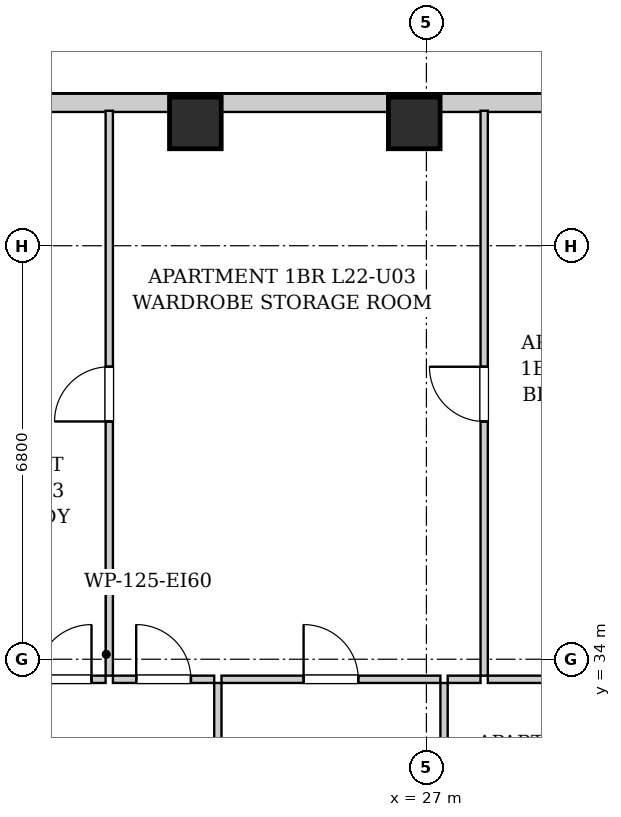
"""IFC4 building model, lengths in metres.
Left out: names, types, materials, properties, quantities, classifications, styles, units other than length and angle.
Written with IfcOpenShell. Run it as: python <this file> out.ifc"""

import sys

from ifc_helpers import new_model, si_unit, direction, frame, frame_2d, origin, origin_2d, place, context, subcontext, project, spatial, rectangle, extrude, element, fill, save


model = new_model("IFC4")
c1 = context("Model", 3, precision=1e-05, world=origin(), true_north=direction((0.0, 1.0)))
c2 = subcontext(c1, "Body", "Model", "MODEL_VIEW")
j1 = project(units=[si_unit("LENGTHUNIT", "METRE"), si_unit("PLANEANGLEUNIT", "RADIAN")], contexts=[c1])
p1 = place(None, origin())
s1 = spatial("IfcSite", under=j1, at=p1, CompositionType="ELEMENT")
p2 = place(p1, origin())
s2 = spatial("IfcBuilding", under=s1, at=p2, CompositionType="ELEMENT")
p3 = place(p2, frame((0.0, 0.0, 81.5)))
s3 = spatial("IfcBuildingStorey", under=s2, at=p3, CompositionType="ELEMENT", Elevation=81.5)
for number, where, z_axis, x_axis in (
    (1, (23.2, 42.82, 0.0), (0.0, 0.0, 1.0), (1.0, 0.0, 0.0)),
    (2, (26.8, 42.82, 0.0), (0.0, 0.0, 1.0), (1.0, 0.0, 0.0)),
):
    element("IfcColumn", number, at=place(p3, frame(where, z_axis=z_axis, x_axis=x_axis)), inside=s3, PredefinedType="COLUMN", context=c2, shape_type="SweptSolid", body=[
        extrude(rectangle(XDim=0.85, YDim=0.85, at=origin_2d()), origin(), (0.0, 0.0, 1.0), 3.2),
    ])
p4 = place(p3, frame((10.0, 43.15, 0.0), z_axis=(0.0, 0.0, 1.0), x_axis=(1.0, 0.0, 0.0)))
e3 = element("IfcWall", 3, at=p4, inside=s3, PredefinedType="SOLIDWALL", context=c2, shape_type="SweptSolid", body=[
    extrude(rectangle(XDim=22.5, YDim=0.3, at=frame_2d((11.25, 0.0))), origin(), (0.0, 0.0, 1.0), 2.94),
])
p5 = place(p4, frame((5.475, 0.0, 0.55)))
e4 = element("IfcOpeningElement", 4, at=p5, cuts=e3, PredefinedType="OPENING", context=c2, shape_type="SweptSolid", body=[
    extrude(rectangle(XDim=1.35, YDim=1.2, at=frame_2d((0.675, 0.6))), frame((0.0, 0.16, 0.0), z_axis=(0.0, -1.0, 0.0), x_axis=(1.0, 0.0, 0.0)), (0.0, 0.0, 1.0), 0.32),
])
p6 = place(p4, frame((9.3, 0.0, 0.55)))
e5 = element("IfcOpeningElement", 5, at=p6, cuts=e3, PredefinedType="OPENING", context=c2, shape_type="SweptSolid", body=[
    extrude(rectangle(XDim=1.35, YDim=1.2, at=frame_2d((0.675, 0.6))), frame((0.0, 0.16, 0.0), z_axis=(0.0, -1.0, 0.0), x_axis=(1.0, 0.0, 0.0)), (0.0, 0.0, 1.0), 0.32),
])
p7 = place(p4, frame((18.975, 0.0, 0.55)))
e6 = element("IfcOpeningElement", 6, at=p7, cuts=e3, PredefinedType="OPENING", context=c2, shape_type="SweptSolid", body=[
    extrude(rectangle(XDim=1.35, YDim=1.2, at=frame_2d((0.675, 0.6))), frame((0.0, 0.16, 0.0), z_axis=(0.0, -1.0, 0.0), x_axis=(1.0, 0.0, 0.0)), (0.0, 0.0, 1.0), 0.32),
])
p8 = place(p4, frame((21.59, 0.0, 0.55)))
e7 = element("IfcOpeningElement", 7, at=p8, cuts=e3, PredefinedType="OPENING", context=c2, shape_type="SweptSolid", body=[
    extrude(rectangle(XDim=0.68, YDim=1.2, at=frame_2d((0.34, 0.6))), frame((0.0, 0.16, 0.0), z_axis=(0.0, -1.0, 0.0), x_axis=(1.0, 0.0, 0.0)), (0.0, 0.0, 1.0), 0.32),
])
p9 = place(p3, frame((23.57, 30.76, 0.0), z_axis=(0.0, 0.0, 1.0), x_axis=(0.0, 1.0, 0.0)))
e8 = element("IfcWall", 8, at=p9, inside=s3, PredefinedType="PARTITIONING", context=c2, shape_type="SweptSolid", body=[
    extrude(rectangle(XDim=2.85, YDim=0.12, at=frame_2d((1.425, 0.0))), origin(), (0.0, 0.0, 1.0), 2.94),
])
p10 = place(p9, frame((0.975, 0.0, 0.0)))
e9 = element("IfcOpeningElement", 9, at=p10, cuts=e8, PredefinedType="OPENING", context=c2, shape_type="SweptSolid", body=[
    extrude(rectangle(XDim=0.9, YDim=2.05, at=frame_2d((0.45, 1.025))), frame((0.0, 0.07, 0.0), z_axis=(0.0, -1.0, 0.0), x_axis=(1.0, 0.0, 0.0)), (0.0, 0.0, 1.0), 0.14),
])
p11 = place(p3, frame((20.36, 33.67, 0.0), z_axis=(0.0, 0.0, 1.0), x_axis=(1.0, 0.0, 0.0)))
e10 = element("IfcWall", 10, at=p11, inside=s3, PredefinedType="PARTITIONING", context=c2, shape_type="SweptSolid", body=[
    extrude(rectangle(XDim=1.364, YDim=0.12, at=frame_2d((0.682, 0.0))), origin(), (0.0, 0.0, 1.0), 2.94),
])
p12 = place(p11, frame((0.232, 0.0, 0.0)))
e11 = element("IfcOpeningElement", 11, at=p12, cuts=e10, PredefinedType="OPENING", context=c2, shape_type="SweptSolid", body=[
    extrude(rectangle(XDim=0.9, YDim=2.05, at=frame_2d((0.45, 1.025))), frame((0.0, 0.07, 0.0), z_axis=(0.0, -1.0, 0.0), x_axis=(1.0, 0.0, 0.0)), (0.0, 0.0, 1.0), 0.14),
])
p13 = place(p3, frame((21.844, 33.67, 0.0), z_axis=(0.0, 0.0, 1.0), x_axis=(1.0, 0.0, 0.0)))
e12 = element("IfcWall", 12, at=p13, inside=s3, PredefinedType="PARTITIONING", context=c2, shape_type="SweptSolid", body=[
    extrude(rectangle(XDim=1.666, YDim=0.12, at=frame_2d((0.833, 0.0))), origin(), (0.0, 0.0, 1.0), 2.94),
])
p14 = place(p13, frame((0.383, 0.0, 0.0)))
e13 = element("IfcOpeningElement", 13, at=p14, cuts=e12, PredefinedType="OPENING", context=c2, shape_type="SweptSolid", body=[
    extrude(rectangle(XDim=0.9, YDim=2.05, at=frame_2d((0.45, 1.025))), frame((0.0, 0.07, 0.0), z_axis=(0.0, -1.0, 0.0), x_axis=(1.0, 0.0, 0.0)), (0.0, 0.0, 1.0), 0.14),
])
p15 = place(p3, frame((27.29, 30.76, 0.0), z_axis=(0.0, 0.0, 1.0), x_axis=(0.0, 1.0, 0.0)))
e14 = element("IfcWall", 14, at=p15, inside=s3, PredefinedType="PARTITIONING", context=c2, shape_type="SweptSolid", body=[
    extrude(rectangle(XDim=2.85, YDim=0.12, at=frame_2d((1.425, 0.0))), origin(), (0.0, 0.0, 1.0), 2.94),
])
p16 = place(p15, frame((0.975, 0.0, 0.0)))
e15 = element("IfcOpeningElement", 15, at=p16, cuts=e14, PredefinedType="OPENING", context=c2, shape_type="SweptSolid", body=[
    extrude(rectangle(XDim=0.9, YDim=2.05, at=frame_2d((0.45, 1.025))), frame((0.0, 0.07, 0.0), z_axis=(0.0, -1.0, 0.0), x_axis=(1.0, 0.0, 0.0)), (0.0, 0.0, 1.0), 0.14),
])
p17 = place(p3, frame((23.63, 33.67, 0.0), z_axis=(0.0, 0.0, 1.0), x_axis=(1.0, 0.0, 0.0)))
e16 = element("IfcWall", 16, at=p17, inside=s3, PredefinedType="PARTITIONING", context=c2, shape_type="SweptSolid", body=[
    extrude(rectangle(XDim=3.6, YDim=0.12, at=frame_2d((1.8, 0.0))), origin(), (0.0, 0.0, 1.0), 2.94),
])
p18 = place(p17, frame((1.35, 0.0, 0.0)))
e17 = element("IfcOpeningElement", 17, at=p18, cuts=e16, PredefinedType="OPENING", context=c2, shape_type="SweptSolid", body=[
    extrude(rectangle(XDim=0.9, YDim=2.05, at=frame_2d((0.45, 1.025))), frame((0.0, 0.07, 0.0), z_axis=(0.0, -1.0, 0.0), x_axis=(1.0, 0.0, 0.0)), (0.0, 0.0, 1.0), 0.14),
])
p19 = place(p3, frame((27.35, 33.67, 0.0), z_axis=(0.0, 0.0, 1.0), x_axis=(1.0, 0.0, 0.0)))
e18 = element("IfcWall", 18, at=p19, inside=s3, PredefinedType="PARTITIONING", context=c2, shape_type="SweptSolid", body=[
    extrude(rectangle(XDim=0.54, YDim=0.12, at=frame_2d((0.27, 0.0))), origin(), (0.0, 0.0, 1.0), 2.94),
])
p20 = place(p3, frame((28.01, 33.67, 0.0), z_axis=(0.0, 0.0, 1.0), x_axis=(1.0, 0.0, 0.0)))
e19 = element("IfcWall", 19, at=p20, inside=s3, PredefinedType="PARTITIONING", context=c2, shape_type="SweptSolid", body=[
    extrude(rectangle(XDim=3.24, YDim=0.12, at=frame_2d((1.62, 0.0))), origin(), (0.0, 0.0, 1.0), 2.94),
])
p21 = place(p20, frame((1.17, 0.0, 0.0)))
e20 = element("IfcOpeningElement", 20, at=p21, cuts=e19, PredefinedType="OPENING", context=c2, shape_type="SweptSolid", body=[
    extrude(rectangle(XDim=0.9, YDim=2.05, at=frame_2d((0.45, 1.025))), frame((0.0, 0.07, 0.0), z_axis=(0.0, -1.0, 0.0), x_axis=(1.0, 0.0, 0.0)), (0.0, 0.0, 1.0), 0.14),
])
p22 = place(p3, frame((21.784, 33.73, 0.0), z_axis=(0.0, 0.0, 1.0), x_axis=(0.0, 1.0, 0.0)))
e21 = element("IfcWall", 21, at=p22, inside=s3, PredefinedType="PARTITIONING", context=c2, shape_type="SweptSolid", body=[
    extrude(rectangle(XDim=9.29, YDim=0.12, at=frame_2d((4.645, 0.0))), origin(), (0.0, 0.0, 1.0), 2.94),
])
p23 = place(p22, frame((4.18, 0.0, 0.0)))
e22 = element("IfcOpeningElement", 22, at=p23, cuts=e21, PredefinedType="OPENING", context=c2, shape_type="SweptSolid", body=[
    extrude(rectangle(XDim=0.9, YDim=2.05, at=frame_2d((0.45, 1.025))), frame((0.0, 0.07, 0.0), z_axis=(0.0, -1.0, 0.0), x_axis=(1.0, 0.0, 0.0)), (0.0, 0.0, 1.0), 0.14),
])
p24 = place(p3, frame((27.95, 33.73, 0.0), z_axis=(0.0, 0.0, 1.0), x_axis=(0.0, 1.0, 0.0)))
e23 = element("IfcWall", 23, at=p24, inside=s3, PredefinedType="PARTITIONING", context=c2, shape_type="SweptSolid", body=[
    extrude(rectangle(XDim=9.29, YDim=0.12, at=frame_2d((4.645, 0.0))), origin(), (0.0, 0.0, 1.0), 2.94),
])
p25 = place(p24, frame((4.18, 0.0, 0.0)))
e24 = element("IfcOpeningElement", 24, at=p25, cuts=e23, PredefinedType="OPENING", context=c2, shape_type="SweptSolid", body=[
    extrude(rectangle(XDim=0.9, YDim=2.05, at=frame_2d((0.45, 1.025))), frame((0.0, 0.07, 0.0), z_axis=(0.0, -1.0, 0.0), x_axis=(1.0, 0.0, 0.0)), (0.0, 0.0, 1.0), 0.14),
])
p26 = place(p12, origin())
e25 = element("IfcDoor", 25, at=p26, inside=s3, OperationType="SINGLE_SWING_RIGHT", PredefinedType="DOOR", context=c2, shape_type="SweptSolid", body=[
    extrude(rectangle(XDim=0.9, YDim=2.05, at=frame_2d((0.45, 1.025))), frame((0.0, 0.025, 0.0), z_axis=(0.0, -1.0, 0.0), x_axis=(1.0, 0.0, 0.0)), (0.0, 0.0, 1.0), 0.05),
])
fill(e11, e25)
p27 = place(p14, origin())
e26 = element("IfcDoor", 26, at=p27, inside=s3, OperationType="SINGLE_SWING_LEFT", PredefinedType="DOOR", context=c2, shape_type="SweptSolid", body=[
    extrude(rectangle(XDim=0.9, YDim=2.05, at=frame_2d((0.45, 1.025))), frame((0.0, 0.025, 0.0), z_axis=(0.0, -1.0, 0.0), x_axis=(1.0, 0.0, 0.0)), (0.0, 0.0, 1.0), 0.05),
])
fill(e13, e26)
p28 = place(p18, origin())
e27 = element("IfcDoor", 27, at=p28, inside=s3, OperationType="SINGLE_SWING_LEFT", PredefinedType="DOOR", context=c2, shape_type="SweptSolid", body=[
    extrude(rectangle(XDim=0.9, YDim=2.05, at=frame_2d((0.45, 1.025))), frame((0.0, 0.025, 0.0), z_axis=(0.0, -1.0, 0.0), x_axis=(1.0, 0.0, 0.0)), (0.0, 0.0, 1.0), 0.05),
])
fill(e17, e27)
p29 = place(p23, origin())
e28 = element("IfcDoor", 28, at=p29, inside=s3, OperationType="SINGLE_SWING_LEFT", PredefinedType="DOOR", context=c2, shape_type="SweptSolid", body=[
    extrude(rectangle(XDim=0.9, YDim=2.05, at=frame_2d((0.45, 1.025))), frame((0.0, 0.025, 0.0), z_axis=(0.0, -1.0, 0.0), x_axis=(1.0, 0.0, 0.0)), (0.0, 0.0, 1.0), 0.05),
])
fill(e22, e28)
p30 = place(p25, origin())
e29 = element("IfcDoor", 29, at=p30, inside=s3, OperationType="SINGLE_SWING_RIGHT", PredefinedType="DOOR", context=c2, shape_type="SweptSolid", body=[
    extrude(rectangle(XDim=0.9, YDim=2.05, at=frame_2d((0.45, 1.025))), frame((0.0, 0.025, 0.0), z_axis=(0.0, -1.0, 0.0), x_axis=(1.0, 0.0, 0.0)), (0.0, 0.0, 1.0), 0.05),
])
fill(e24, e29)
save(model, sys.argv[1])
